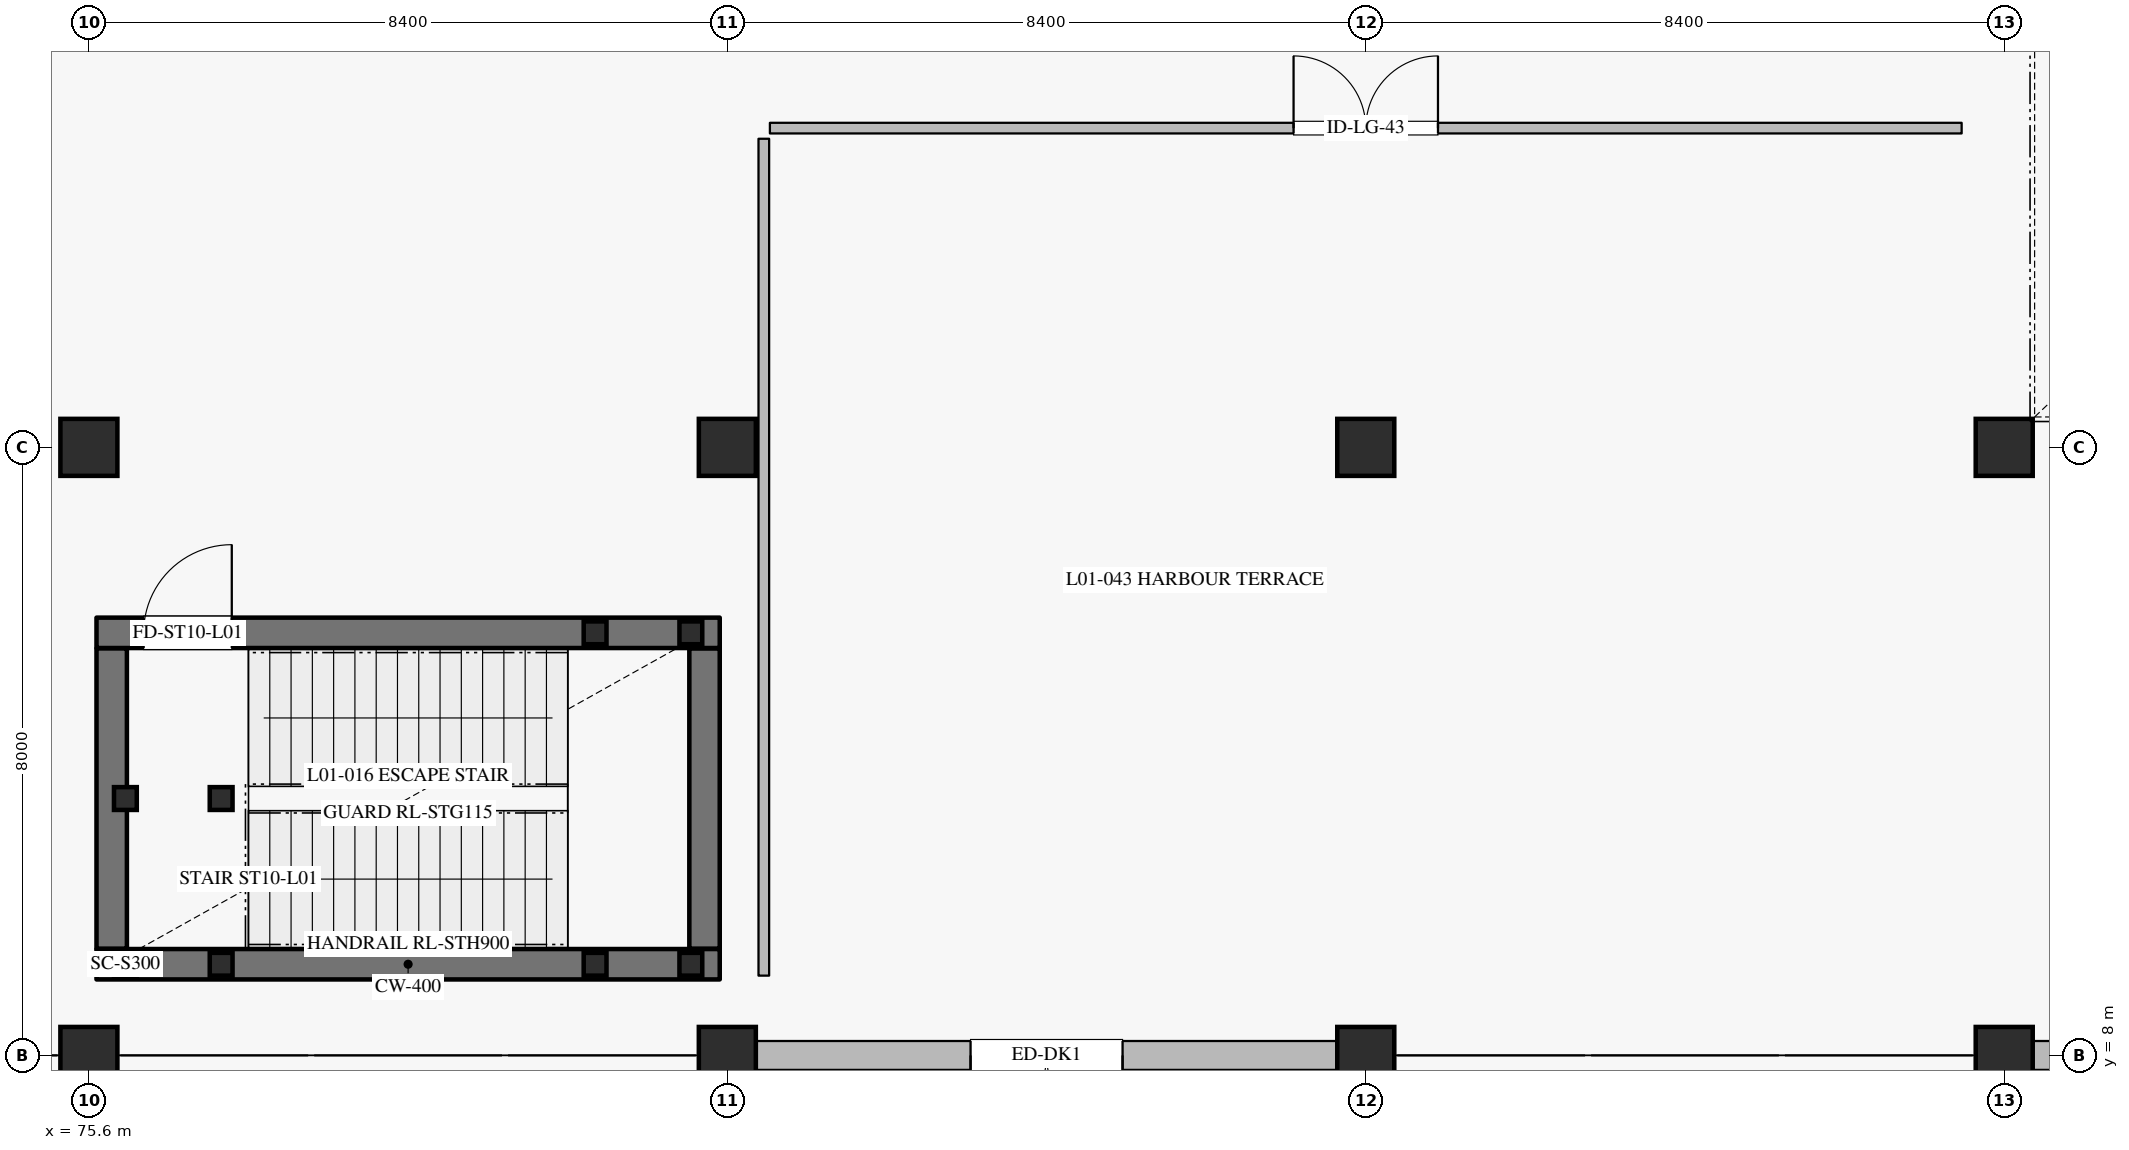
"""IFC4 building model, lengths in metres.
Left out: names, types, materials, properties, quantities, classifications, styles, units other than length and angle.
Written with IfcOpenShell. Run it as: python <this file> out.ifc"""

import sys

from ifc_helpers import new_model, si_unit, direction, frame, frame_2d, origin, origin_2d, place, context, subcontext, project, spatial, rectangle, hollow_rectangle, extrude, element, fill, save


model = new_model("IFC4")
c1 = context("Model", 3, precision=1e-05, world=origin(), true_north=direction((0.0, 1.0)))
c2 = subcontext(c1, "Body", "Model", "MODEL_VIEW")
j1 = project(units=[si_unit("LENGTHUNIT", "METRE"), si_unit("PLANEANGLEUNIT", "RADIAN")], contexts=[c1])
p1 = place(None, origin())
s1 = spatial("IfcSite", under=j1, at=p1, CompositionType="ELEMENT")
p2 = place(p1, origin())
s2 = spatial("IfcBuilding", under=s1, at=p2, CompositionType="ELEMENT")
p3 = place(p2, frame((0.0, 0.0, 6.0)))
s3 = spatial("IfcBuildingStorey", under=s2, at=p3, CompositionType="ELEMENT", Elevation=6.0)
for number, where, z_axis, x_axis in (
    (1, (75.6, 8.0, 0.0), (0.0, 0.0, 1.0), (1.0, 0.0, 0.0)),
    (2, (75.6, 16.0, 0.0), (0.0, 0.0, 1.0), (1.0, 0.0, 0.0)),
    (3, (84.0, 8.0, 0.0), (0.0, 0.0, 1.0), (1.0, 0.0, 0.0)),
    (4, (84.0, 16.0, 0.0), (0.0, 0.0, 1.0), (1.0, 0.0, 0.0)),
    (5, (92.4, 8.0, 0.0), (0.0, 0.0, 1.0), (1.0, 0.0, 0.0)),
    (6, (92.4, 16.0, 0.0), (0.0, 0.0, 1.0), (1.0, 0.0, 0.0)),
    (7, (100.8, 8.0, 0.0), (0.0, 0.0, 1.0), (1.0, 0.0, 0.0)),
    (8, (100.8, 16.0, 0.0), (0.0, 0.0, 1.0), (1.0, 0.0, 0.0)),
):
    element("IfcColumn", number, at=place(p3, frame(where, z_axis=z_axis, x_axis=x_axis)), inside=s3, PredefinedType="COLUMN", context=c2, shape_type="SweptSolid", body=[
        extrude(rectangle(XDim=0.75, YDim=0.75, at=origin_2d()), origin(), (0.0, 0.0, 1.0), 5.4),
    ])
p4 = place(p3, frame((108.825, 8.0, 0.0), z_axis=(0.0, 0.0, 1.0), x_axis=(-1.0, 0.0, 0.0)))
e9 = element("IfcWall", 9, at=p4, inside=s3, PredefinedType="SOLIDWALL", context=c2, shape_type="SweptSolid", body=[
    extrude(rectangle(XDim=7.65, YDim=0.38, at=frame_2d((3.825, 0.0))), origin(), (0.0, 0.0, 1.0), 4.45),
])
p5 = place(p4, frame((2.825, 0.0, 0.0)))
e10 = element("IfcOpeningElement", 10, at=p5, cuts=e9, PredefinedType="OPENING", context=c2, shape_type="SweptSolid", body=[
    extrude(rectangle(XDim=2.0, YDim=2.4, at=frame_2d((1.0, 1.2))), frame((0.0, 0.2, 0.0), z_axis=(0.0, -1.0, 0.0), x_axis=(1.0, 0.0, 0.0)), (0.0, 0.0, 1.0), 0.4),
])
p6 = place(p3, frame((92.025, 8.0, 0.0), z_axis=(0.0, 0.0, 1.0), x_axis=(-1.0, 0.0, 0.0)))
e11 = element("IfcWall", 11, at=p6, inside=s3, PredefinedType="SOLIDWALL", context=c2, shape_type="SweptSolid", body=[
    extrude(rectangle(XDim=7.65, YDim=0.38, at=frame_2d((3.825, 0.0))), origin(), (0.0, 0.0, 1.0), 4.45),
])
p7 = place(p6, frame((2.825, 0.0, 0.0)))
e12 = element("IfcOpeningElement", 12, at=p7, cuts=e11, PredefinedType="OPENING", context=c2, shape_type="SweptSolid", body=[
    extrude(rectangle(XDim=2.0, YDim=2.4, at=frame_2d((1.0, 1.2))), frame((0.0, 0.2, 0.0), z_axis=(0.0, -1.0, 0.0), x_axis=(1.0, 0.0, 0.0)), (0.0, 0.0, 1.0), 0.4),
])
p8 = place(p3, frame((75.7, 9.2, 0.0), z_axis=(0.0, 0.0, 1.0), x_axis=(1.0, 0.0, 0.0)))
e13 = element("IfcWall", 13, at=p8, inside=s3, PredefinedType="SHEAR", context=c2, shape_type="SweptSolid", body=[
    extrude(rectangle(XDim=8.2, YDim=0.4, at=frame_2d((4.1, 0.0))), origin(), (0.0, 0.0, 1.0), 5.045),
])
p9 = place(p3, frame((83.7, 9.405, 0.0), z_axis=(0.0, 0.0, 1.0), x_axis=(0.0, 1.0, 0.0)))
e14 = element("IfcWall", 14, at=p9, inside=s3, PredefinedType="SHEAR", context=c2, shape_type="SweptSolid", body=[
    extrude(rectangle(XDim=3.95, YDim=0.4, at=frame_2d((1.975, 0.0))), origin(), (0.0, 0.0, 1.0), 5.045),
])
p10 = place(p3, frame((75.7, 13.56, 0.0), z_axis=(0.0, 0.0, 1.0), x_axis=(1.0, 0.0, 0.0)))
e15 = element("IfcWall", 15, at=p10, inside=s3, PredefinedType="SHEAR", context=c2, shape_type="SweptSolid", body=[
    extrude(rectangle(XDim=8.2, YDim=0.4, at=frame_2d((4.1, 0.0))), origin(), (0.0, 0.0, 1.0), 5.045),
])
p11 = place(p10, frame((0.62, 0.0, 0.0)))
e16 = element("IfcOpeningElement", 16, at=p11, cuts=e15, PredefinedType="OPENING", context=c2, shape_type="SweptSolid", body=[
    extrude(rectangle(XDim=1.16, YDim=2.2, at=frame_2d((0.58, 1.1))), frame((0.0, 0.21, 0.0), z_axis=(0.0, -1.0, 0.0), x_axis=(1.0, 0.0, 0.0)), (0.0, 0.0, 1.0), 0.42),
])
p12 = place(p3, frame((75.9, 9.405, 0.0), z_axis=(0.0, 0.0, 1.0), x_axis=(0.0, 1.0, 0.0)))
e17 = element("IfcWall", 17, at=p12, inside=s3, PredefinedType="SHEAR", context=c2, shape_type="SweptSolid", body=[
    extrude(rectangle(XDim=3.95, YDim=0.4, at=frame_2d((1.975, 0.0))), origin(), (0.0, 0.0, 1.0), 5.045),
])
for number, where, z_axis, x_axis in (
    (18, (76.08, 9.2, 0.0), (0.0, 0.0, 1.0), (1.0, 0.0, 0.0)),
    (19, (76.08, 11.38, 0.0), (0.0, 0.0, 1.0), (1.0, 0.0, 0.0)),
    (20, (77.34, 9.2, 0.0), (0.0, 0.0, 1.0), (1.0, 0.0, 0.0)),
    (21, (77.34, 11.38, 0.0), (0.0, 0.0, 1.0), (1.0, 0.0, 0.0)),
):
    element("IfcColumn", number, at=place(p3, frame(where, z_axis=z_axis, x_axis=x_axis)), inside=s3, PredefinedType="COLUMN", context=c2, shape_type="SweptSolid", body=[
        extrude(hollow_rectangle(XDim=0.3, YDim=0.3, WallThickness=0.012, at=origin_2d()), origin(), (0.0, 0.0, 1.0), 5.22),
    ])
for number, where, z_axis, x_axis in (
    (22, (82.26, 9.2, -3.0), (0.0, 0.0, 1.0), (1.0, 0.0, 0.0)),
    (23, (82.26, 13.56, -3.0), (0.0, 0.0, 1.0), (1.0, 0.0, 0.0)),
    (24, (83.52, 9.2, -3.0), (0.0, 0.0, 1.0), (1.0, 0.0, 0.0)),
    (25, (83.52, 13.56, -3.0), (0.0, 0.0, 1.0), (1.0, 0.0, 0.0)),
):
    element("IfcColumn", number, at=place(p3, frame(where, z_axis=z_axis, x_axis=x_axis)), inside=s3, PredefinedType="COLUMN", context=c2, shape_type="SweptSolid", body=[
        extrude(hollow_rectangle(XDim=0.3, YDim=0.3, WallThickness=0.012, at=origin_2d()), origin(), (0.0, 0.0, 1.0), 5.52),
    ])
p13 = place(p3, frame((84.56, 20.2, 0.0), z_axis=(0.0, 0.0, 1.0), x_axis=(1.0, 0.0, 0.0)))
e26 = element("IfcWall", 26, at=p13, inside=s3, PredefinedType="PARTITIONING", context=c2, shape_type="SweptSolid", body=[
    extrude(rectangle(XDim=15.68, YDim=0.14, at=frame_2d((7.84, 0.0))), origin(), (0.0, 0.0, 1.0), 5.045),
])
p14 = place(p13, frame((6.89, 0.0, 0.0)))
e27 = element("IfcOpeningElement", 27, at=p14, cuts=e26, PredefinedType="OPENING", context=c2, shape_type="SweptSolid", body=[
    extrude(rectangle(XDim=1.9, YDim=2.4, at=frame_2d((0.95, 1.2))), frame((0.0, 0.08, 0.0), z_axis=(0.0, -1.0, 0.0), x_axis=(1.0, 0.0, 0.0)), (0.0, 0.0, 1.0), 0.16),
])
p15 = place(p3, frame((84.48, 9.05, 0.0), z_axis=(0.0, 0.0, 1.0), x_axis=(0.0, 1.0, 0.0)))
e28 = element("IfcWall", 28, at=p15, inside=s3, PredefinedType="PARTITIONING", context=c2, shape_type="SweptSolid", body=[
    extrude(rectangle(XDim=11.01, YDim=0.14, at=frame_2d((5.505, 0.0))), origin(), (0.0, 0.0, 1.0), 5.045),
])
p16 = place(p7, origin())
e29 = element("IfcDoor", 29, at=p16, inside=s3, OperationType="DOUBLE_DOOR_SINGLE_SWING", PredefinedType="DOOR", context=c2, shape_type="SweptSolid", body=[
    extrude(rectangle(XDim=2.0, YDim=2.4, at=frame_2d((1.0, 1.2))), frame((0.0, 0.025, 0.0), z_axis=(0.0, -1.0, 0.0), x_axis=(1.0, 0.0, 0.0)), (0.0, 0.0, 1.0), 0.05),
])
fill(e12, e29)
p17 = place(p11, origin())
e30 = element("IfcDoor", 30, at=p17, inside=s3, OperationType="SINGLE_SWING_RIGHT", PredefinedType="DOOR", context=c2, shape_type="SweptSolid", body=[
    extrude(rectangle(XDim=1.16, YDim=2.2, at=frame_2d((0.58, 1.1))), frame((0.0, 0.025, 0.0), z_axis=(0.0, -1.0, 0.0), x_axis=(1.0, 0.0, 0.0)), (0.0, 0.0, 1.0), 0.05),
])
fill(e16, e30)
p18 = place(p14, origin())
e31 = element("IfcDoor", 31, at=p18, inside=s3, OperationType="DOUBLE_DOOR_SINGLE_SWING", PredefinedType="DOOR", context=c2, shape_type="SweptSolid", body=[
    extrude(rectangle(XDim=1.9, YDim=2.4, at=frame_2d((0.95, 1.2))), frame((0.0, 0.025, 0.0), z_axis=(0.0, -1.0, 0.0), x_axis=(1.0, 0.0, 0.0)), (0.0, 0.0, 1.0), 0.05),
])
fill(e27, e31)
save(model, sys.argv[1])
